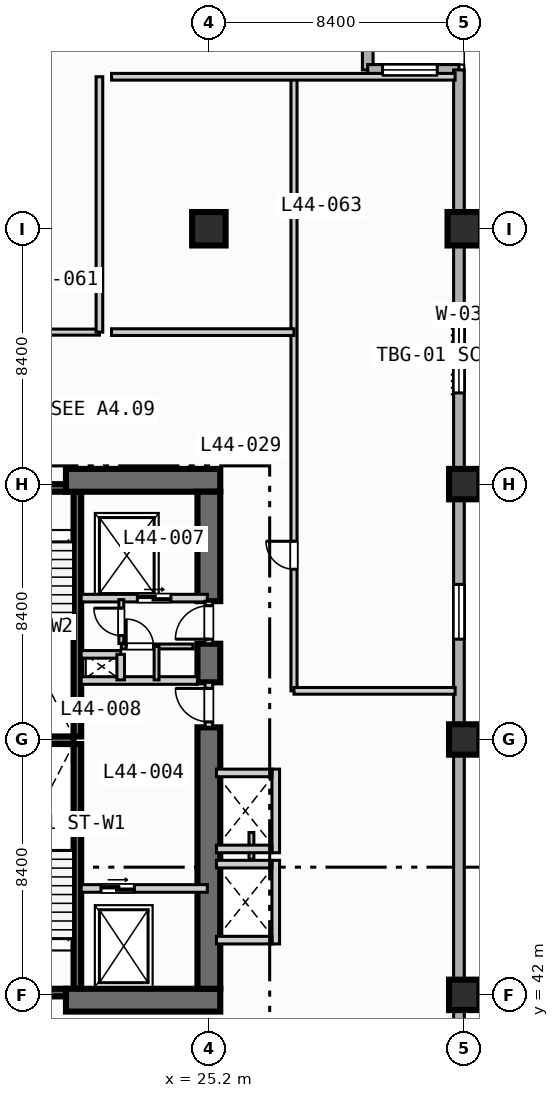
"""IFC4 building model, lengths in metres.
Left out: names, types, materials, properties, quantities, classifications, styles, units other than length and angle.
Written with IfcOpenShell. Run it as: python <this file> out.ifc"""

import sys

from ifc_helpers import new_model, si_unit, direction, frame, frame_2d, origin, origin_2d, place, context, subcontext, project, spatial, rectangle, extrude, element, fill, save


model = new_model("IFC4")
c1 = context("Model", 3, precision=1e-05, world=origin(), true_north=direction((0.0, 1.0)))
c2 = subcontext(c1, "Body", "Model", "MODEL_VIEW")
j1 = project(units=[si_unit("LENGTHUNIT", "METRE"), si_unit("PLANEANGLEUNIT", "RADIAN")], contexts=[c1])
p1 = place(None, origin())
s1 = spatial("IfcSite", under=j1, at=p1, CompositionType="ELEMENT")
p2 = place(p1, origin())
s2 = spatial("IfcBuilding", under=s1, at=p2, CompositionType="ELEMENT")
p3 = place(p2, frame((0.0, 0.0, 182.8)))
s3 = spatial("IfcBuildingStorey", under=s2, at=p3, CompositionType="ELEMENT", Elevation=182.8)
for number, where, z_axis, x_axis in (
    (1, (20.875, 42.2, 0.0), (0.0, 0.0, 1.0), (0.0, 1.0, 0.0)),
    (2, (20.875, 50.5, 0.0), (0.0, 0.0, 1.0), (0.0, 1.0, 0.0)),
):
    element("IfcWall", number, at=place(p3, frame(where, z_axis=z_axis, x_axis=x_axis)), inside=s3, PredefinedType="SOLIDWALL", context=c2, shape_type="SweptSolid", body=[
        extrude(rectangle(XDim=8.05, YDim=0.25, at=frame_2d((4.025, 0.0))), origin(), (0.0, 0.0, 1.0), 3.47),
    ])
p4 = place(p3, frame((17.25, 50.375, 0.0), z_axis=(0.0, 0.0, 1.0), x_axis=(1.0, 0.0, 0.0)))
e3 = element("IfcWall", 3, at=p4, inside=s3, PredefinedType="SOLIDWALL", context=c2, shape_type="SweptSolid", body=[
    extrude(rectangle(XDim=3.5, YDim=0.25, at=frame_2d((1.75, 0.0))), origin(), (0.0, 0.0, 1.0), 3.47),
])
for number, where, z_axis, x_axis in (
    (4, (20.5, 41.825, 0.0), (0.0, 0.0, 1.0), (1.0, 0.0, 0.0)),
    (5, (20.5, 58.925, 0.0), (0.0, 0.0, 1.0), (1.0, 0.0, 0.0)),
):
    element("IfcWall", number, at=place(p3, frame(where, z_axis=z_axis, x_axis=x_axis)), inside=s3, PredefinedType="SHEAR", context=c2, shape_type="SweptSolid", body=[
        extrude(rectangle(XDim=5.075, YDim=0.75, at=frame_2d((2.538, 0.0))), origin(), (0.0, 0.0, 1.0), 3.47),
    ])
p5 = place(p3, frame((25.2, 42.2, 0.0), z_axis=(0.0, 0.0, 1.0), x_axis=(0.0, 1.0, 0.0)))
e6 = element("IfcWall", 6, at=p5, inside=s3, PredefinedType="SHEAR", context=c2, shape_type="SweptSolid", body=[
    extrude(rectangle(XDim=8.6, YDim=0.75, at=frame_2d((4.3, 0.0))), origin(), (0.0, 0.0, 1.0), 3.47),
])
p6 = place(p3, frame((25.2, 52.28, 0.0), z_axis=(0.0, 0.0, 1.0), x_axis=(0.0, 1.0, 0.0)))
e7 = element("IfcWall", 7, at=p6, inside=s3, PredefinedType="SHEAR", context=c2, shape_type="SweptSolid", body=[
    extrude(rectangle(XDim=1.27, YDim=0.75, at=frame_2d((0.635, 0.0))), origin(), (0.0, 0.0, 1.0), 3.47),
])
p7 = place(p3, frame((25.2, 54.95, 0.0), z_axis=(0.0, 0.0, 1.0), x_axis=(0.0, 1.0, 0.0)))
e8 = element("IfcWall", 8, at=p7, inside=s3, PredefinedType="SHEAR", context=c2, shape_type="SweptSolid", body=[
    extrude(rectangle(XDim=3.6, YDim=0.75, at=frame_2d((1.8, 0.0))), origin(), (0.0, 0.0, 1.0), 3.47),
])
p8 = place(p3, frame((25.2, 67.2, 0.0), z_axis=(0.0, 0.0, 1.0), x_axis=(1.0, 0.0, 0.0)))
e9 = element("IfcColumn", 9, at=p8, inside=s3, PredefinedType="COLUMN", context=c2, shape_type="SweptSolid", body=[
    extrude(rectangle(XDim=1.1, YDim=1.1, at=origin_2d()), origin(), (0.0, 0.0, 1.0), 3.7),
])
for number, where, z_axis, x_axis in (
    (10, (33.6, 42.0, 0.0), (0.0, 0.0, 1.0), (1.0, 0.0, 0.0)),
    (11, (33.6, 50.4, 0.0), (0.0, 0.0, 1.0), (1.0, 0.0, 0.0)),
    (12, (33.6, 58.8, 0.0), (0.0, 0.0, 1.0), (1.0, 0.0, 0.0)),
):
    element("IfcColumn", number, at=place(p3, frame(where, z_axis=z_axis, x_axis=x_axis)), inside=s3, PredefinedType="COLUMN", context=c2, shape_type="SweptSolid", body=[
        extrude(rectangle(XDim=1.0, YDim=1.0, at=origin_2d()), origin(), (0.0, 0.0, 1.0), 3.7),
    ])
p9 = place(p3, frame((33.6, 67.2, 0.0), z_axis=(0.0, 0.0, 1.0), x_axis=(1.0, 0.0, 0.0)))
e13 = element("IfcColumn", 13, at=p9, inside=s3, PredefinedType="COLUMN", context=c2, shape_type="SweptSolid", body=[
    extrude(rectangle(XDim=1.1, YDim=1.1, at=origin_2d()), origin(), (0.0, 0.0, 1.0), 3.7),
])
p10 = place(p3, frame((30.425, 75.425, 0.0), z_axis=(0.0, 0.0, 1.0), x_axis=(0.0, -1.0, 0.0)))
e14 = element("IfcWall", 14, at=p10, inside=s3, PredefinedType="STANDARD", context=c2, shape_type="SweptSolid", body=[
    extrude(rectangle(XDim=3.0, YDim=0.35, at=frame_2d((1.5, 0.0))), origin(), (0.0, 0.0, 1.0), 3.47),
])
p11 = place(p3, frame((30.425, 72.425, 0.0), z_axis=(0.0, 0.0, 1.0), x_axis=(1.0, 0.0, 0.0)))
e15 = element("IfcWall", 15, at=p11, inside=s3, PredefinedType="STANDARD", context=c2, shape_type="SweptSolid", body=[
    extrude(rectangle(XDim=3.0, YDim=0.35, at=frame_2d((1.5, 0.0))), origin(), (0.0, 0.0, 1.0), 3.47),
])
p12 = place(p11, frame((0.488, 0.0, 0.85)))
e16 = element("IfcOpeningElement", 16, at=p12, cuts=e15, PredefinedType="OPENING", context=c2, shape_type="SweptSolid", body=[
    extrude(rectangle(XDim=1.8, YDim=1.8, at=frame_2d((0.9, 0.9))), frame((0.0, 0.185, 0.0), z_axis=(0.0, -1.0, 0.0), x_axis=(1.0, 0.0, 0.0)), (0.0, 0.0, 1.0), 0.37),
])
p13 = place(p3, frame((33.425, 72.425, 0.0), z_axis=(0.0, 0.0, 1.0), x_axis=(0.0, -1.0, 0.0)))
e17 = element("IfcWall", 17, at=p13, inside=s3, PredefinedType="STANDARD", context=c2, shape_type="SweptSolid", body=[
    extrude(rectangle(XDim=39.0, YDim=0.35, at=frame_2d((19.5, 0.0))), origin(), (0.0, 0.0, 1.0), 3.47),
])
p14 = place(p13, frame((33.725, 0.0, 0.85)))
e18 = element("IfcOpeningElement", 18, at=p14, cuts=e17, PredefinedType="OPENING", context=c2, shape_type="SweptSolid", body=[
    extrude(rectangle(XDim=1.8, YDim=1.8, at=frame_2d((0.9, 0.9))), frame((0.0, 0.185, 0.0), z_axis=(0.0, -1.0, 0.0), x_axis=(1.0, 0.0, 0.0)), (0.0, 0.0, 1.0), 0.37),
])
p15 = place(p13, frame((16.925, 0.0, 0.85)))
e19 = element("IfcOpeningElement", 19, at=p15, cuts=e17, PredefinedType="OPENING", context=c2, shape_type="SweptSolid", body=[
    extrude(rectangle(XDim=1.8, YDim=1.8, at=frame_2d((0.9, 0.9))), frame((0.0, 0.185, 0.0), z_axis=(0.0, -1.0, 0.0), x_axis=(1.0, 0.0, 0.0)), (0.0, 0.0, 1.0), 0.37),
])
p16 = place(p13, frame((8.225, 0.0, 0.85)))
e20 = element("IfcOpeningElement", 20, at=p16, cuts=e17, PredefinedType="OPENING", context=c2, shape_type="SweptSolid", body=[
    extrude(rectangle(XDim=2.4, YDim=1.95, at=frame_2d((1.2, 0.975))), frame((0.0, 0.185, 0.0), z_axis=(0.0, -1.0, 0.0), x_axis=(1.0, 0.0, 0.0)), (0.0, 0.0, 1.0), 0.37),
])
p17 = place(p3, frame((18.0, 42.075, 0.0), z_axis=(0.0, 0.0, 1.0), x_axis=(1.0, 0.0, 0.0)))
e21 = element("IfcWall", 21, at=p17, inside=s3, PredefinedType="SOLIDWALL", context=c2, shape_type="SweptSolid", body=[
    extrude(rectangle(XDim=2.5, YDim=0.25, at=frame_2d((1.25, 0.0))), origin(), (0.0, 0.0, 1.0), 3.47),
])
p18 = place(p17, frame((0.7, 0.0, 0.0)))
e22 = element("IfcOpeningElement", 22, at=p18, cuts=e21, PredefinedType="OPENING", context=c2, shape_type="SweptSolid", body=[
    extrude(rectangle(XDim=1.1, YDim=2.15, at=frame_2d((0.55, 1.075))), frame((0.0, 0.135, 0.0), z_axis=(0.0, -1.0, 0.0), x_axis=(1.0, 0.0, 0.0)), (0.0, 0.0, 1.0), 0.27),
])
p19 = place(p3, frame((18.0, 58.675, 0.0), z_axis=(0.0, 0.0, 1.0), x_axis=(1.0, 0.0, 0.0)))
e23 = element("IfcWall", 23, at=p19, inside=s3, PredefinedType="SOLIDWALL", context=c2, shape_type="SweptSolid", body=[
    extrude(rectangle(XDim=2.5, YDim=0.25, at=frame_2d((1.25, 0.0))), origin(), (0.0, 0.0, 1.0), 3.47),
])
p20 = place(p19, frame((0.7, 0.0, 0.0)))
e24 = element("IfcOpeningElement", 24, at=p20, cuts=e23, PredefinedType="OPENING", context=c2, shape_type="SweptSolid", body=[
    extrude(rectangle(XDim=1.1, YDim=2.15, at=frame_2d((0.55, 1.075))), frame((0.0, 0.135, 0.0), z_axis=(0.0, -1.0, 0.0), x_axis=(1.0, 0.0, 0.0)), (0.0, 0.0, 1.0), 0.27),
])
p21 = place(p3, frame((21.0, 45.5, 0.0), z_axis=(0.0, 0.0, 1.0), x_axis=(1.0, 0.0, 0.0)))
e25 = element("IfcWall", 25, at=p21, inside=s3, PredefinedType="SOLIDWALL", context=c2, shape_type="SweptSolid", body=[
    extrude(rectangle(XDim=4.15, YDim=0.25, at=frame_2d((2.075, 0.0))), origin(), (0.0, 0.0, 1.0), 3.47),
])
p22 = place(p21, frame((0.65, 0.0, 0.0)))
e26 = element("IfcOpeningElement", 26, at=p22, cuts=e25, PredefinedType="OPENING", context=c2, shape_type="SweptSolid", body=[
    extrude(rectangle(XDim=1.1, YDim=2.15, at=frame_2d((0.55, 1.075))), frame((0.0, 0.135, 0.0), z_axis=(0.0, -1.0, 0.0), x_axis=(1.0, 0.0, 0.0)), (0.0, 0.0, 1.0), 0.27),
])
p23 = place(p3, frame((25.2, 50.8, 0.0), z_axis=(0.0, 0.0, 1.0), x_axis=(0.0, 1.0, 0.0)))
e27 = element("IfcWall", 27, at=p23, inside=s3, PredefinedType="SOLIDWALL", context=c2, shape_type="SweptSolid", body=[
    extrude(rectangle(XDim=1.48, YDim=0.25, at=frame_2d((0.74, 0.0))), origin(), (0.0, 0.0, 1.0), 3.47),
])
p24 = place(p23, frame((0.18, 0.0, 0.0)))
e28 = element("IfcOpeningElement", 28, at=p24, cuts=e27, PredefinedType="OPENING", context=c2, shape_type="SweptSolid", body=[
    extrude(rectangle(XDim=1.1, YDim=2.15, at=frame_2d((0.55, 1.075))), frame((0.0, 0.135, 0.0), z_axis=(0.0, -1.0, 0.0), x_axis=(1.0, 0.0, 0.0)), (0.0, 0.0, 1.0), 0.27),
])
p25 = place(p3, frame((21.0, 52.34, 0.0), z_axis=(0.0, 0.0, 1.0), x_axis=(1.0, 0.0, 0.0)))
e29 = element("IfcWall", 29, at=p25, inside=s3, PredefinedType="SOLIDWALL", context=c2, shape_type="SweptSolid", body=[
    extrude(rectangle(XDim=3.825, YDim=0.25, at=frame_2d((1.913, 0.0))), origin(), (0.0, 0.0, 1.0), 3.47),
])
p26 = place(p3, frame((21.0, 55.05, 0.0), z_axis=(0.0, 0.0, 1.0), x_axis=(1.0, 0.0, 0.0)))
e30 = element("IfcWall", 30, at=p26, inside=s3, PredefinedType="SOLIDWALL", context=c2, shape_type="SweptSolid", body=[
    extrude(rectangle(XDim=4.15, YDim=0.25, at=frame_2d((2.075, 0.0))), origin(), (0.0, 0.0, 1.0), 3.47),
])
p27 = place(p26, frame((1.85, 0.0, 0.0)))
e31 = element("IfcOpeningElement", 31, at=p27, cuts=e30, PredefinedType="OPENING", context=c2, shape_type="SweptSolid", body=[
    extrude(rectangle(XDim=1.1, YDim=2.15, at=frame_2d((0.55, 1.075))), frame((0.0, 0.135, 0.0), z_axis=(0.0, -1.0, 0.0), x_axis=(1.0, 0.0, 0.0)), (0.0, 0.0, 1.0), 0.27),
])
p28 = place(p3, frame((25.2, 53.55, 0.0), z_axis=(0.0, 0.0, 1.0), x_axis=(0.0, 1.0, 0.0)))
e32 = element("IfcWall", 32, at=p28, inside=s3, PredefinedType="SOLIDWALL", context=c2, shape_type="SweptSolid", body=[
    extrude(rectangle(XDim=1.4, YDim=0.25, at=frame_2d((0.7, 0.0))), origin(), (0.0, 0.0, 1.0), 3.47),
])
p29 = place(p28, frame((0.15, 0.0, 0.0)))
e33 = element("IfcOpeningElement", 33, at=p29, cuts=e32, PredefinedType="OPENING", context=c2, shape_type="SweptSolid", body=[
    extrude(rectangle(XDim=1.1, YDim=2.15, at=frame_2d((0.55, 1.075))), frame((0.0, 0.135, 0.0), z_axis=(0.0, -1.0, 0.0), x_axis=(1.0, 0.0, 0.0)), (0.0, 0.0, 1.0), 0.27),
])
p30 = place(p3, frame((21.0, 53.2, 0.0), z_axis=(0.0, 0.0, 1.0), x_axis=(1.0, 0.0, 0.0)))
e34 = element("IfcWall", 34, at=p30, inside=s3, PredefinedType="SOLIDWALL", context=c2, shape_type="SweptSolid", body=[
    extrude(rectangle(XDim=1.3, YDim=0.25, at=frame_2d((0.65, 0.0))), origin(), (0.0, 0.0, 1.0), 3.47),
])
p31 = place(p3, frame((22.3, 52.36, 0.0), z_axis=(0.0, 0.0, 1.0), x_axis=(0.0, 1.0, 0.0)))
e35 = element("IfcWall", 35, at=p31, inside=s3, PredefinedType="SOLIDWALL", context=c2, shape_type="SweptSolid", body=[
    extrude(rectangle(XDim=0.84, YDim=0.25, at=frame_2d((0.42, 0.0))), origin(), (0.0, 0.0, 1.0), 3.47),
])
p32 = place(p3, frame((22.32, 53.56, 0.0), z_axis=(0.0, 0.0, 1.0), x_axis=(0.0, 1.0, 0.0)))
e36 = element("IfcWall", 36, at=p32, inside=s3, PredefinedType="PARTITIONING", context=c2, shape_type="SweptSolid", body=[
    extrude(rectangle(XDim=1.44, YDim=0.16, at=frame_2d((0.72, 0.0))), origin(), (0.0, 0.0, 1.0), 3.47),
])
p33 = place(p32, frame((0.26, 0.0, 0.0)))
e37 = element("IfcOpeningElement", 37, at=p33, cuts=e36, PredefinedType="OPENING", context=c2, shape_type="SweptSolid", body=[
    extrude(rectangle(XDim=0.9, YDim=2.1, at=frame_2d((0.45, 1.05))), frame((0.0, 0.09, 0.0), z_axis=(0.0, -1.0, 0.0), x_axis=(1.0, 0.0, 0.0)), (0.0, 0.0, 1.0), 0.18),
])
p34 = place(p3, frame((22.32, 53.46, 0.0), z_axis=(0.0, 0.0, 1.0), x_axis=(1.0, 0.0, 0.0)))
e38 = element("IfcWall", 38, at=p34, inside=s3, PredefinedType="PARTITIONING", context=c2, shape_type="SweptSolid", body=[
    extrude(rectangle(XDim=2.36, YDim=0.16, at=frame_2d((1.18, 0.0))), origin(), (0.0, 0.0, 1.0), 3.47),
])
p35 = place(p34, frame((0.16, 0.0, 0.0)))
e39 = element("IfcOpeningElement", 39, at=p35, cuts=e38, PredefinedType="OPENING", context=c2, shape_type="SweptSolid", body=[
    extrude(rectangle(XDim=0.9, YDim=2.1, at=frame_2d((0.45, 1.05))), frame((0.0, 0.09, 0.0), z_axis=(0.0, -1.0, 0.0), x_axis=(1.0, 0.0, 0.0)), (0.0, 0.0, 1.0), 0.18),
])
p36 = place(p3, frame((23.48, 52.36, 0.0), z_axis=(0.0, 0.0, 1.0), x_axis=(0.0, 1.0, 0.0)))
e40 = element("IfcWall", 40, at=p36, inside=s3, PredefinedType="PARTITIONING", context=c2, shape_type="SweptSolid", body=[
    extrude(rectangle(XDim=1.1, YDim=0.16, at=frame_2d((0.55, 0.0))), origin(), (0.0, 0.0, 1.0), 3.47),
])
p37 = place(p3, frame((27.4, 43.675, 0.0), z_axis=(0.0, 0.0, 1.0), x_axis=(0.0, 1.0, 0.0)))
e41 = element("IfcWall", 41, at=p37, inside=s3, PredefinedType="SOLIDWALL", context=c2, shape_type="SweptSolid", body=[
    extrude(rectangle(XDim=2.75, YDim=0.25, at=frame_2d((1.375, 0.0))), origin(), (0.0, 0.0, 1.0), 3.47),
])
for number, where, z_axis, x_axis in (
    (42, (25.45, 43.8, 0.0), (0.0, 0.0, 1.0), (1.0, 0.0, 0.0)),
    (43, (25.45, 46.3, 0.0), (0.0, 0.0, 1.0), (1.0, 0.0, 0.0)),
):
    element("IfcWall", number, at=place(p3, frame(where, z_axis=z_axis, x_axis=x_axis)), inside=s3, PredefinedType="SOLIDWALL", context=c2, shape_type="SweptSolid", body=[
        extrude(rectangle(XDim=1.825, YDim=0.25, at=frame_2d((0.913, 0.0))), origin(), (0.0, 0.0, 1.0), 3.47),
    ])
p38 = place(p3, frame((26.6, 46.46, 0.0), z_axis=(0.0, 0.0, 1.0), x_axis=(0.0, 1.0, 0.0)))
e44 = element("IfcWall", 44, at=p38, inside=s3, PredefinedType="PARTITIONING", context=c2, shape_type="SweptSolid", body=[
    extrude(rectangle(XDim=0.88, YDim=0.16, at=frame_2d((0.44, 0.0))), origin(), (0.0, 0.0, 1.0), 3.47),
])
p39 = place(p3, frame((27.4, 46.675, 0.0), z_axis=(0.0, 0.0, 1.0), x_axis=(0.0, 1.0, 0.0)))
e45 = element("IfcWall", 45, at=p39, inside=s3, PredefinedType="SOLIDWALL", context=c2, shape_type="SweptSolid", body=[
    extrude(rectangle(XDim=2.75, YDim=0.25, at=frame_2d((1.375, 0.0))), origin(), (0.0, 0.0, 1.0), 3.47),
])
for number, where, z_axis, x_axis in (
    (46, (25.45, 46.8, 0.0), (0.0, 0.0, 1.0), (1.0, 0.0, 0.0)),
    (47, (25.45, 49.3, 0.0), (0.0, 0.0, 1.0), (1.0, 0.0, 0.0)),
):
    element("IfcWall", number, at=place(p3, frame(where, z_axis=z_axis, x_axis=x_axis)), inside=s3, PredefinedType="SOLIDWALL", context=c2, shape_type="SweptSolid", body=[
        extrude(rectangle(XDim=1.825, YDim=0.25, at=frame_2d((0.913, 0.0))), origin(), (0.0, 0.0, 1.0), 3.47),
    ])
p40 = place(p3, frame((3.4, 63.8, 0.0), z_axis=(0.0, 0.0, 1.0), x_axis=(1.0, 0.0, 0.0)))
e48 = element("IfcWall", 48, at=p40, inside=s3, PredefinedType="PARTITIONING", context=c2, shape_type="SweptSolid", body=[
    extrude(rectangle(XDim=18.2, YDim=0.2, at=frame_2d((9.1, 0.0))), origin(), (0.0, 0.0, 1.0), 3.47),
])
p41 = place(p40, frame((4.05, 0.0, 0.0)))
e49 = element("IfcOpeningElement", 49, at=p41, cuts=e48, PredefinedType="OPENING", context=c2, shape_type="SweptSolid", body=[
    extrude(rectangle(XDim=1.0, YDim=2.15, at=frame_2d((0.5, 1.075))), frame((0.0, 0.11, 0.0), z_axis=(0.0, -1.0, 0.0), x_axis=(1.0, 0.0, 0.0)), (0.0, 0.0, 1.0), 0.22),
])
p42 = place(p3, frame((21.6, 63.8, 0.0), z_axis=(0.0, 0.0, 1.0), x_axis=(0.0, 1.0, 0.0)))
e50 = element("IfcWall", 50, at=p42, inside=s3, PredefinedType="PARTITIONING", context=c2, shape_type="SweptSolid", body=[
    extrude(rectangle(XDim=8.4, YDim=0.22, at=frame_2d((4.2, 0.0))), origin(), (0.0, 0.0, 1.0), 3.47),
])
p43 = place(p3, frame((28.0, 52.0, 0.0), z_axis=(0.0, 0.0, 1.0), x_axis=(0.0, 1.0, 0.0)))
e51 = element("IfcWall", 51, at=p43, inside=s3, PredefinedType="PARTITIONING", context=c2, shape_type="SweptSolid", body=[
    extrude(rectangle(XDim=20.2, YDim=0.2, at=frame_2d((10.1, 0.0))), origin(), (0.0, 0.0, 1.0), 3.47),
])
p44 = place(p43, frame((4.0, 0.0, 0.0)))
e52 = element("IfcOpeningElement", 52, at=p44, cuts=e51, PredefinedType="OPENING", context=c2, shape_type="SweptSolid", body=[
    extrude(rectangle(XDim=0.92, YDim=2.1, at=frame_2d((0.46, 1.05))), frame((0.0, 0.11, 0.0), z_axis=(0.0, -1.0, 0.0), x_axis=(1.0, 0.0, 0.0)), (0.0, 0.0, 1.0), 0.22),
])
p45 = place(p3, frame((28.0, 52.0, 0.0), z_axis=(0.0, 0.0, 1.0), x_axis=(1.0, 0.0, 0.0)))
e53 = element("IfcWall", 53, at=p45, inside=s3, PredefinedType="PARTITIONING", context=c2, shape_type="SweptSolid", body=[
    extrude(rectangle(XDim=5.3, YDim=0.22, at=frame_2d((2.65, 0.0))), origin(), (0.0, 0.0, 1.0), 3.47),
])
p46 = place(p3, frame((22.0, 72.2, 0.0), z_axis=(0.0, 0.0, 1.0), x_axis=(1.0, 0.0, 0.0)))
e54 = element("IfcWall", 54, at=p46, inside=s3, PredefinedType="PARTITIONING", context=c2, shape_type="SweptSolid", body=[
    extrude(rectangle(XDim=11.3, YDim=0.22, at=frame_2d((5.65, 0.0))), origin(), (0.0, 0.0, 1.0), 3.47),
])
p47 = place(p3, frame((22.0, 63.8, 0.0), z_axis=(0.0, 0.0, 1.0), x_axis=(1.0, 0.0, 0.0)))
e55 = element("IfcWall", 55, at=p47, inside=s3, PredefinedType="PARTITIONING", context=c2, shape_type="SweptSolid", body=[
    extrude(rectangle(XDim=6.0, YDim=0.22, at=frame_2d((3.0, 0.0))), origin(), (0.0, 0.0, 1.0), 3.47),
])
p48 = place(p12, origin())
e56 = element("IfcWindow", 56, at=p48, inside=s3, PartitioningType="SINGLE_PANEL", PredefinedType="WINDOW", context=c2, shape_type="SweptSolid", body=[
    extrude(rectangle(XDim=1.8, YDim=1.8, at=frame_2d((0.9, 0.9))), frame((0.0, 0.03, 0.0), z_axis=(0.0, -1.0, 0.0), x_axis=(1.0, 0.0, 0.0)), (0.0, 0.0, 1.0), 0.06),
])
fill(e16, e56)
p49 = place(p15, origin())
e57 = element("IfcWindow", 57, at=p49, inside=s3, PartitioningType="SINGLE_PANEL", PredefinedType="WINDOW", context=c2, shape_type="SweptSolid", body=[
    extrude(rectangle(XDim=1.8, YDim=1.8, at=frame_2d((0.9, 0.9))), frame((0.0, 0.03, 0.0), z_axis=(0.0, -1.0, 0.0), x_axis=(1.0, 0.0, 0.0)), (0.0, 0.0, 1.0), 0.06),
])
fill(e19, e57)
p50 = place(p16, origin())
e58 = element("IfcWindow", 58, at=p50, inside=s3, PartitioningType="SINGLE_PANEL", PredefinedType="WINDOW", context=c2, shape_type="SweptSolid", body=[
    extrude(rectangle(XDim=2.4, YDim=1.95, at=frame_2d((1.2, 0.975))), frame((0.0, 0.03, 0.0), z_axis=(0.0, -1.0, 0.0), x_axis=(1.0, 0.0, 0.0)), (0.0, 0.0, 1.0), 0.06),
])
fill(e20, e58)
p51 = place(p22, origin())
e59 = element("IfcDoor", 59, at=p51, inside=s3, OperationType="SLIDING_TO_LEFT", PredefinedType="DOOR", context=c2, shape_type="SweptSolid", body=[
    extrude(rectangle(XDim=1.1, YDim=2.15, at=frame_2d((0.55, 1.075))), frame((0.0, 0.025, 0.0), z_axis=(0.0, -1.0, 0.0), x_axis=(1.0, 0.0, 0.0)), (0.0, 0.0, 1.0), 0.05),
])
fill(e26, e59)
p52 = place(p24, origin())
e60 = element("IfcDoor", 60, at=p52, inside=s3, OperationType="SINGLE_SWING_RIGHT", PredefinedType="DOOR", context=c2, shape_type="SweptSolid", body=[
    extrude(rectangle(XDim=1.1, YDim=2.15, at=frame_2d((0.55, 1.075))), frame((0.0, 0.025, 0.0), z_axis=(0.0, -1.0, 0.0), x_axis=(1.0, 0.0, 0.0)), (0.0, 0.0, 1.0), 0.05),
])
fill(e28, e60)
p53 = place(p27, origin())
e61 = element("IfcDoor", 61, at=p53, inside=s3, OperationType="SLIDING_TO_LEFT", PredefinedType="DOOR", context=c2, shape_type="SweptSolid", body=[
    extrude(rectangle(XDim=1.1, YDim=2.15, at=frame_2d((0.55, 1.075))), frame((0.0, 0.025, 0.0), z_axis=(0.0, -1.0, 0.0), x_axis=(1.0, 0.0, 0.0)), (0.0, 0.0, 1.0), 0.05),
])
fill(e31, e61)
p54 = place(p29, origin())
e62 = element("IfcDoor", 62, at=p54, inside=s3, OperationType="SINGLE_SWING_LEFT", PredefinedType="DOOR", context=c2, shape_type="SweptSolid", body=[
    extrude(rectangle(XDim=1.1, YDim=2.15, at=frame_2d((0.55, 1.075))), frame((0.0, 0.025, 0.0), z_axis=(0.0, -1.0, 0.0), x_axis=(1.0, 0.0, 0.0)), (0.0, 0.0, 1.0), 0.05),
])
fill(e33, e62)
p55 = place(p33, origin())
e63 = element("IfcDoor", 63, at=p55, inside=s3, OperationType="SINGLE_SWING_RIGHT", PredefinedType="DOOR", context=c2, shape_type="SweptSolid", body=[
    extrude(rectangle(XDim=0.9, YDim=2.1, at=frame_2d((0.45, 1.05))), frame((0.0, 0.025, 0.0), z_axis=(0.0, -1.0, 0.0), x_axis=(1.0, 0.0, 0.0)), (0.0, 0.0, 1.0), 0.05),
])
fill(e37, e63)
p56 = place(p35, origin())
e64 = element("IfcDoor", 64, at=p56, inside=s3, OperationType="SINGLE_SWING_LEFT", PredefinedType="DOOR", context=c2, shape_type="SweptSolid", body=[
    extrude(rectangle(XDim=0.9, YDim=2.1, at=frame_2d((0.45, 1.05))), frame((0.0, 0.025, 0.0), z_axis=(0.0, -1.0, 0.0), x_axis=(1.0, 0.0, 0.0)), (0.0, 0.0, 1.0), 0.05),
])
fill(e39, e64)
p57 = place(p44, origin())
e65 = element("IfcDoor", 65, at=p57, inside=s3, OperationType="SINGLE_SWING_RIGHT", PredefinedType="DOOR", context=c2, shape_type="SweptSolid", body=[
    extrude(rectangle(XDim=0.92, YDim=2.1, at=frame_2d((0.46, 1.05))), frame((0.0, 0.025, 0.0), z_axis=(0.0, -1.0, 0.0), x_axis=(1.0, 0.0, 0.0)), (0.0, 0.0, 1.0), 0.05),
])
fill(e52, e65)
save(model, sys.argv[1])
